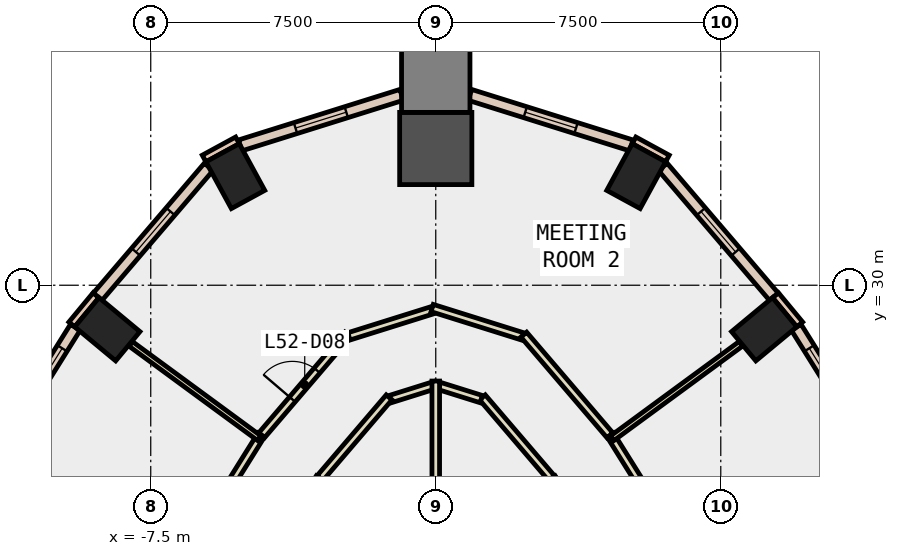
"""IFC4 building model, lengths in metres.
Left out: names, types, materials, properties, quantities, classifications, styles, units other than length and angle.
Written with IfcOpenShell. Run it as: python <this file> out.ifc"""

import sys

from ifc_helpers import new_model, si_unit, direction, frame, frame_2d, origin, origin_2d, place, context, subcontext, project, spatial, rectangle, extrude, element, fill, save


model = new_model("IFC4")
c1 = context("Model", 3, precision=1e-05, world=origin(), true_north=direction((0.0, 1.0)))
c2 = subcontext(c1, "Body", "Model", "MODEL_VIEW")
j1 = project(units=[si_unit("LENGTHUNIT", "METRE"), si_unit("PLANEANGLEUNIT", "RADIAN")], contexts=[c1])
p1 = place(None, origin())
s1 = spatial("IfcSite", under=j1, at=p1, CompositionType="ELEMENT")
p2 = place(p1, origin())
s2 = spatial("IfcBuilding", under=s1, at=p2, CompositionType="ELEMENT")
p3 = place(p2, frame((0.0, 0.0, 231.8)))
s3 = spatial("IfcBuildingStorey", under=s2, at=p3, CompositionType="ELEMENT", Elevation=231.8)
for number, where, z_axis, x_axis in (
    (1, (8.642, 28.842, -0.4), (0.0, 0.0, 1.0), (-0.639, 0.769, 0.0)),
    (2, (5.274, 32.871, -0.4), (0.0, 0.0, 1.0), (-0.878, 0.478, 0.0)),
):
    element("IfcColumn", number, at=place(p3, frame(where, z_axis=z_axis, x_axis=x_axis)), inside=s3, PredefinedType="COLUMN", context=c2, shape_type="SweptSolid", body=[
        extrude(rectangle(XDim=1.0, YDim=1.4, at=origin_2d()), origin(), (0.0, 0.0, 1.0), 4.0),
    ])
p4 = place(p3, frame((0.0, 33.598, -0.4), z_axis=(0.0, 0.0, 1.0), x_axis=(0.0, 1.0, 0.0)))
e3 = element("IfcColumn", 3, at=p4, inside=s3, PredefinedType="COLUMN", context=c2, shape_type="SweptSolid", body=[
    extrude(rectangle(XDim=1.9, YDim=1.9, at=origin_2d()), origin(), (0.0, 0.0, 1.0), 4.0),
])
for number, where, z_axis, x_axis in (
    (4, (-5.274, 32.871, -0.4), (0.0, 0.0, 1.0), (0.878, 0.478, 0.0)),
    (5, (-8.642, 28.842, -0.4), (0.0, 0.0, 1.0), (0.639, 0.769, 0.0)),
):
    element("IfcColumn", number, at=place(p3, frame(where, z_axis=z_axis, x_axis=x_axis)), inside=s3, PredefinedType="COLUMN", context=c2, shape_type="SweptSolid", body=[
        extrude(rectangle(XDim=1.0, YDim=1.4, at=origin_2d()), origin(), (0.0, 0.0, 1.0), 4.0),
    ])
p5 = place(p3, frame((0.0, 35.448, -0.4), z_axis=(0.0, 0.0, 1.0), x_axis=(0.0, 1.0, 0.0)))
e6 = element("IfcColumn", 6, at=p5, inside=s3, PredefinedType="COLUMN", context=c2, shape_type="SweptSolid", body=[
    extrude(rectangle(XDim=1.8, YDim=1.8, at=origin_2d()), origin(), (0.0, 0.0, 1.0), 4.0),
])
for number, where, z_axis, x_axis in (
    (7, (6.096, 33.334, 0.0), (0.0, 0.0, 1.0), (-0.878, 0.478, 0.0)),
    (8, (-5.218, 33.812, 0.0), (0.0, 0.0, 1.0), (-0.878, -0.478, 0.0)),
):
    element("IfcWall", number, at=place(p3, frame(where, z_axis=z_axis, x_axis=x_axis)), inside=s3, PredefinedType="STANDARD", context=c2, shape_type="SweptSolid", body=[
        extrude(rectangle(XDim=1.0, YDim=0.2, at=frame_2d((0.5, 0.0))), origin(), (0.0, 0.0, 1.0), 3.6),
    ])
for number, where, z_axis, x_axis in (
    (9, (9.577, 28.968, 0.0), (0.0, 0.0, 1.0), (-0.638, 0.77, 0.0)),
    (10, (-8.939, 29.738, 0.0), (0.0, 0.0, 1.0), (-0.638, -0.77, 0.0)),
):
    element("IfcWall", number, at=place(p3, frame(where, z_axis=z_axis, x_axis=x_axis)), inside=s3, PredefinedType="STANDARD", context=c2, shape_type="SweptSolid", body=[
        extrude(rectangle(XDim=1.0, YDim=0.2, at=frame_2d((0.5, 0.0))), origin(), (0.0, 0.0, 1.0), 3.6),
    ])
p6 = place(p3, frame((13.41, 22.614, 0.0), z_axis=(0.0, 0.0, 1.0), x_axis=(-0.530037467052, 0.847974223383, 0.0)))
e11 = element("IfcWall", 11, at=p6, inside=s3, PredefinedType="STANDARD", context=c2, shape_type="SweptSolid", body=[
    extrude(rectangle(XDim=7.405, YDim=0.3, at=frame_2d((3.702, 0.0))), origin(), (0.0, 0.0, 1.0), 3.6),
])
p7 = place(p6, frame((0.651, 0.0, 0.9)))
e12 = element("IfcOpeningElement", 12, at=p7, cuts=e11, PredefinedType="OPENING", context=c2, shape_type="SweptSolid", body=[
    extrude(rectangle(XDim=2.4, YDim=2.6, at=frame_2d((1.2, 1.3))), frame((0.0, 0.16, 0.0), z_axis=(0.0, -1.0, 0.0), x_axis=(1.0, 0.0, 0.0)), (0.0, 0.0, 1.0), 0.32),
])
p8 = place(p6, frame((4.354, 0.0, 0.9)))
e13 = element("IfcOpeningElement", 13, at=p8, cuts=e11, PredefinedType="OPENING", context=c2, shape_type="SweptSolid", body=[
    extrude(rectangle(XDim=2.4, YDim=2.6, at=frame_2d((1.2, 1.3))), frame((0.0, 0.16, 0.0), z_axis=(0.0, -1.0, 0.0), x_axis=(1.0, 0.0, 0.0)), (0.0, 0.0, 1.0), 0.32),
])
p9 = place(p3, frame((8.895, 29.7, 0.0), z_axis=(0.0, 0.0, 1.0), x_axis=(-0.649967502437, 0.75996200285, 0.0)))
e14 = element("IfcWall", 14, at=p9, inside=s3, PredefinedType="STANDARD", context=c2, shape_type="SweptSolid", body=[
    extrude(rectangle(XDim=4.492, YDim=0.3, at=frame_2d((2.246, 0.0))), origin(), (0.0, 0.0, 1.0), 3.6),
])
p10 = place(p9, frame((1.546, 0.0, 0.9)))
e15 = element("IfcOpeningElement", 15, at=p10, cuts=e14, PredefinedType="OPENING", context=c2, shape_type="SweptSolid", body=[
    extrude(rectangle(XDim=1.4, YDim=2.6, at=frame_2d((0.7, 1.3))), frame((0.0, 0.16, 0.0), z_axis=(0.0, -1.0, 0.0), x_axis=(1.0, 0.0, 0.0)), (0.0, 0.0, 1.0), 0.32),
])
p11 = place(p3, frame((5.146, 33.679, 0.0), z_axis=(0.0, 0.0, 1.0), x_axis=(-0.95429628924, 0.298862162783, 0.0)))
e16 = element("IfcWall", 16, at=p11, inside=s3, PredefinedType="STANDARD", context=c2, shape_type="SweptSolid", body=[
    extrude(rectangle(XDim=4.45, YDim=0.3, at=frame_2d((2.225, 0.0))), origin(), (0.0, 0.0, 1.0), 3.6),
])
p12 = place(p11, frame((1.525, 0.0, 0.9)))
e17 = element("IfcOpeningElement", 17, at=p12, cuts=e16, PredefinedType="OPENING", context=c2, shape_type="SweptSolid", body=[
    extrude(rectangle(XDim=1.4, YDim=2.6, at=frame_2d((0.7, 1.3))), frame((0.0, 0.16, 0.0), z_axis=(0.0, -1.0, 0.0), x_axis=(1.0, 0.0, 0.0)), (0.0, 0.0, 1.0), 0.32),
])
p13 = place(p3, frame((-0.899, 35.009, 0.0), z_axis=(0.0, 0.0, 1.0), x_axis=(-0.95429628924, -0.298862162783, 0.0)))
e18 = element("IfcWall", 18, at=p13, inside=s3, PredefinedType="STANDARD", context=c2, shape_type="SweptSolid", body=[
    extrude(rectangle(XDim=4.45, YDim=0.3, at=frame_2d((2.225, 0.0))), origin(), (0.0, 0.0, 1.0), 3.6),
])
p14 = place(p13, frame((1.525, 0.0, 0.9)))
e19 = element("IfcOpeningElement", 19, at=p14, cuts=e18, PredefinedType="OPENING", context=c2, shape_type="SweptSolid", body=[
    extrude(rectangle(XDim=1.4, YDim=2.6, at=frame_2d((0.7, 1.3))), frame((0.0, 0.16, 0.0), z_axis=(0.0, -1.0, 0.0), x_axis=(1.0, 0.0, 0.0)), (0.0, 0.0, 1.0), 0.32),
])
p15 = place(p3, frame((-5.975, 33.114, 0.0), z_axis=(0.0, 0.0, 1.0), x_axis=(-0.649967502437, -0.75996200285, 0.0)))
e20 = element("IfcWall", 20, at=p15, inside=s3, PredefinedType="STANDARD", context=c2, shape_type="SweptSolid", body=[
    extrude(rectangle(XDim=4.492, YDim=0.3, at=frame_2d((2.246, 0.0))), origin(), (0.0, 0.0, 1.0), 3.6),
])
p16 = place(p15, frame((1.546, 0.0, 0.9)))
e21 = element("IfcOpeningElement", 21, at=p16, cuts=e20, PredefinedType="OPENING", context=c2, shape_type="SweptSolid", body=[
    extrude(rectangle(XDim=1.4, YDim=2.6, at=frame_2d((0.7, 1.3))), frame((0.0, 0.16, 0.0), z_axis=(0.0, -1.0, 0.0), x_axis=(1.0, 0.0, 0.0)), (0.0, 0.0, 1.0), 0.32),
])
p17 = place(p3, frame((-9.485, 28.893, 0.0), z_axis=(0.0, 0.0, 1.0), x_axis=(-0.530037467052, -0.847974223383, 0.0)))
e22 = element("IfcWall", 22, at=p17, inside=s3, PredefinedType="STANDARD", context=c2, shape_type="SweptSolid", body=[
    extrude(rectangle(XDim=7.405, YDim=0.3, at=frame_2d((3.702, 0.0))), origin(), (0.0, 0.0, 1.0), 3.6),
])
p18 = place(p17, frame((0.651, 0.0, 0.9)))
e23 = element("IfcOpeningElement", 23, at=p18, cuts=e22, PredefinedType="OPENING", context=c2, shape_type="SweptSolid", body=[
    extrude(rectangle(XDim=2.4, YDim=2.6, at=frame_2d((1.2, 1.3))), frame((0.0, 0.16, 0.0), z_axis=(0.0, -1.0, 0.0), x_axis=(1.0, 0.0, 0.0)), (0.0, 0.0, 1.0), 0.32),
])
p19 = place(p17, frame((4.354, 0.0, 0.9)))
e24 = element("IfcOpeningElement", 24, at=p19, cuts=e22, PredefinedType="OPENING", context=c2, shape_type="SweptSolid", body=[
    extrude(rectangle(XDim=2.4, YDim=2.6, at=frame_2d((1.2, 1.3))), frame((0.0, 0.16, 0.0), z_axis=(0.0, -1.0, 0.0), x_axis=(1.0, 0.0, 0.0)), (0.0, 0.0, 1.0), 0.32),
])
p20 = place(p3, frame((5.087, 21.685, 0.0), z_axis=(0.0, 0.0, 1.0), x_axis=(-0.529998940003, 0.847998304005, 0.0)))
e25 = element("IfcWall", 25, at=p20, inside=s3, PredefinedType="PARTITIONING", context=c2, shape_type="SweptSolid", body=[
    extrude(rectangle(XDim=3.83, YDim=0.2, at=frame_2d((1.915, 0.0))), origin(), (0.0, 0.0, 1.0), 3.6),
])
p21 = place(p20, frame((1.416, 0.0, 0.0)))
e26 = element("IfcOpeningElement", 26, at=p21, cuts=e25, PredefinedType="OPENING", context=c2, shape_type="SweptSolid", body=[
    extrude(rectangle(XDim=1.0, YDim=2.1, at=frame_2d((0.5, 1.05))), frame((0.0, 0.11, 0.0), z_axis=(0.0, -1.0, 0.0), x_axis=(1.0, 0.0, 0.0)), (0.0, 0.0, 1.0), 0.22),
])
p22 = place(p3, frame((3.045, 24.925, 0.0), z_axis=(0.0, 0.0, 1.0), x_axis=(-0.650057725157, 0.759884829407, 0.0)))
e27 = element("IfcWall", 27, at=p22, inside=s3, PredefinedType="PARTITIONING", context=c2, shape_type="SweptSolid", body=[
    extrude(rectangle(XDim=2.796, YDim=0.2, at=frame_2d((1.398, 0.0))), origin(), (0.0, 0.0, 1.0), 3.6),
])
p23 = place(p3, frame((1.196, 27.004, 0.0), z_axis=(0.0, 0.0, 1.0), x_axis=(-0.954200976086, 0.29916633707, 0.0)))
e28 = element("IfcWall", 28, at=p23, inside=s3, PredefinedType="PARTITIONING", context=c2, shape_type="SweptSolid", body=[
    extrude(rectangle(XDim=1.154, YDim=0.2, at=frame_2d((0.577, 0.0))), origin(), (0.0, 0.0, 1.0), 3.6),
])
p24 = place(p3, frame((0.0, 27.379, 0.0), z_axis=(0.0, 0.0, 1.0), x_axis=(-0.954198830916, -0.299173179075, 0.0)))
e29 = element("IfcWall", 29, at=p24, inside=s3, PredefinedType="PARTITIONING", context=c2, shape_type="SweptSolid", body=[
    extrude(rectangle(XDim=1.253, YDim=0.2, at=frame_2d((0.627, 0.0))), origin(), (0.0, 0.0, 1.0), 3.6),
])
p25 = place(p3, frame((-1.227, 27.05, 0.0), z_axis=(0.0, 0.0, 1.0), x_axis=(-0.650057725157, -0.759884829407, 0.0)))
e30 = element("IfcWall", 30, at=p25, inside=s3, PredefinedType="PARTITIONING", context=c2, shape_type="SweptSolid", body=[
    extrude(rectangle(XDim=2.796, YDim=0.2, at=frame_2d((1.398, 0.0))), origin(), (0.0, 0.0, 1.0), 3.6),
])
p26 = place(p3, frame((-3.057, 24.933, 0.0), z_axis=(0.0, 0.0, 1.0), x_axis=(-0.529998940003, -0.847998304005, 0.0)))
e31 = element("IfcWall", 31, at=p26, inside=s3, PredefinedType="PARTITIONING", context=c2, shape_type="SweptSolid", body=[
    extrude(rectangle(XDim=3.83, YDim=0.2, at=frame_2d((1.915, 0.0))), origin(), (0.0, 0.0, 1.0), 3.6),
])
p27 = place(p26, frame((1.416, 0.0, 0.0)))
e32 = element("IfcOpeningElement", 32, at=p27, cuts=e31, PredefinedType="OPENING", context=c2, shape_type="SweptSolid", body=[
    extrude(rectangle(XDim=1.0, YDim=2.1, at=frame_2d((0.5, 1.05))), frame((0.0, 0.11, 0.0), z_axis=(0.0, -1.0, 0.0), x_axis=(1.0, 0.0, 0.0)), (0.0, 0.0, 1.0), 0.22),
])
p28 = place(p3, frame((4.593, 26.061, 0.0), z_axis=(0.0, 0.0, 1.0), x_axis=(0.530012579093, -0.847989779421, 0.0)))
e33 = element("IfcWall", 33, at=p28, inside=s3, PredefinedType="PARTITIONING", context=c2, shape_type="SweptSolid", body=[
    extrude(rectangle(XDim=8.045, YDim=0.2, at=frame_2d((4.022, 0.0))), origin(), (0.0, 0.0, 1.0), 3.6),
])
p29 = place(p28, frame((3.522, 0.0, 0.0)))
e34 = element("IfcOpeningElement", 34, at=p29, cuts=e33, PredefinedType="OPENING", context=c2, shape_type="SweptSolid", body=[
    extrude(rectangle(XDim=1.0, YDim=2.1, at=frame_2d((0.5, 1.05))), frame((0.0, 0.11, 0.0), z_axis=(0.0, -1.0, 0.0), x_axis=(1.0, 0.0, 0.0)), (0.0, 0.0, 1.0), 0.22),
])
p30 = place(p3, frame((-4.581, 26.052, 0.0), z_axis=(0.0, 0.0, 1.0), x_axis=(0.650040973726, 0.759899159413, 0.0)))
e35 = element("IfcWall", 35, at=p30, inside=s3, PredefinedType="PARTITIONING", context=c2, shape_type="SweptSolid", body=[
    extrude(rectangle(XDim=3.485, YDim=0.2, at=frame_2d((1.742, 0.0))), origin(), (0.0, 0.0, 1.0), 3.6),
])
p31 = place(p30, frame((1.243, 0.0, 0.0)))
e36 = element("IfcOpeningElement", 36, at=p31, cuts=e35, PredefinedType="OPENING", context=c2, shape_type="SweptSolid", body=[
    extrude(rectangle(XDim=1.0, YDim=2.1, at=frame_2d((0.5, 1.05))), frame((0.0, 0.11, 0.0), z_axis=(0.0, -1.0, 0.0), x_axis=(1.0, 0.0, 0.0)), (0.0, 0.0, 1.0), 0.22),
])
p32 = place(p3, frame((-2.285, 28.654, 0.0), z_axis=(0.0, 0.0, 1.0), x_axis=(0.954271519007, 0.298941245085, 0.0)))
e37 = element("IfcWall", 37, at=p32, inside=s3, PredefinedType="PARTITIONING", context=c2, shape_type="SweptSolid", body=[
    extrude(rectangle(XDim=2.295, YDim=0.2, at=frame_2d((1.147, 0.0))), origin(), (0.0, 0.0, 1.0), 3.6),
])
p33 = place(p3, frame((-0.095, 29.4, 0.0), z_axis=(0.0, 0.0, 1.0), x_axis=(0.954235803916, -0.29905522989, 0.0)))
e38 = element("IfcWall", 38, at=p33, inside=s3, PredefinedType="PARTITIONING", context=c2, shape_type="SweptSolid", body=[
    extrude(rectangle(XDim=2.494, YDim=0.2, at=frame_2d((1.247, 0.0))), origin(), (0.0, 0.0, 1.0), 3.6),
])
p34 = place(p3, frame((2.316, 28.7, 0.0), z_axis=(0.0, 0.0, 1.0), x_axis=(0.650040973726, -0.759899159413, 0.0)))
e39 = element("IfcWall", 39, at=p34, inside=s3, PredefinedType="PARTITIONING", context=c2, shape_type="SweptSolid", body=[
    extrude(rectangle(XDim=3.485, YDim=0.2, at=frame_2d((1.742, 0.0))), origin(), (0.0, 0.0, 1.0), 3.6),
])
p35 = place(p3, frame((-8.896, 19.176, 0.0), z_axis=(0.0, 0.0, 1.0), x_axis=(0.529985425286, 0.848006750553, 0.0)))
e40 = element("IfcWall", 40, at=p35, inside=s3, PredefinedType="PARTITIONING", context=c2, shape_type="SweptSolid", body=[
    extrude(rectangle(XDim=8.119, YDim=0.2, at=frame_2d((4.06, 0.0))), origin(), (0.0, 0.0, 1.0), 3.6),
])
p36 = place(p35, frame((3.56, 0.0, 0.0)))
e41 = element("IfcOpeningElement", 41, at=p36, cuts=e40, PredefinedType="OPENING", context=c2, shape_type="SweptSolid", body=[
    extrude(rectangle(XDim=1.0, YDim=2.1, at=frame_2d((0.5, 1.05))), frame((0.0, 0.11, 0.0), z_axis=(0.0, -1.0, 0.0), x_axis=(1.0, 0.0, 0.0)), (0.0, 0.0, 1.0), 0.22),
])
p37 = place(p3, frame((0.0, 23.0, 0.0), z_axis=(0.0, 0.0, 1.0), x_axis=(0.0, 1.0, 0.0)))
e42 = element("IfcWall", 42, at=p37, inside=s3, PredefinedType="PARTITIONING", context=c2, shape_type="SweptSolid", body=[
    extrude(rectangle(XDim=4.479, YDim=0.2, at=frame_2d((2.24, 0.0))), origin(), (0.0, 0.0, 1.0), 3.6),
])
for number, where, z_axis, x_axis in (
    (43, (4.646, 25.976, 0.0), (0.0, 0.0, 1.0), (0.806, 0.592, 0.0)),
    (44, (-4.646, 25.976, 0.0), (0.0, 0.0, 1.0), (-0.806, 0.592, 0.0)),
):
    element("IfcWall", number, at=place(p3, frame(where, z_axis=z_axis, x_axis=x_axis)), inside=s3, PredefinedType="PARTITIONING", context=c2, shape_type="SweptSolid", body=[
        extrude(rectangle(XDim=4.193, YDim=0.15, at=frame_2d((2.096, 0.0))), origin(), (0.0, 0.0, 1.0), 3.6),
    ])
p38 = place(p8, origin())
e45 = element("IfcWindow", 45, at=p38, inside=s3, PartitioningType="SINGLE_PANEL", PredefinedType="WINDOW", context=c2, shape_type="SweptSolid", body=[
    extrude(rectangle(XDim=2.4, YDim=2.6, at=frame_2d((1.2, 1.3))), frame((0.0, 0.03, 0.0), z_axis=(0.0, -1.0, 0.0), x_axis=(1.0, 0.0, 0.0)), (0.0, 0.0, 1.0), 0.06),
])
fill(e13, e45)
p39 = place(p10, origin())
e46 = element("IfcWindow", 46, at=p39, inside=s3, PartitioningType="SINGLE_PANEL", PredefinedType="WINDOW", context=c2, shape_type="SweptSolid", body=[
    extrude(rectangle(XDim=1.4, YDim=2.6, at=frame_2d((0.7, 1.3))), frame((0.0, 0.03, 0.0), z_axis=(0.0, -1.0, 0.0), x_axis=(1.0, 0.0, 0.0)), (0.0, 0.0, 1.0), 0.06),
])
fill(e15, e46)
p40 = place(p12, origin())
e47 = element("IfcWindow", 47, at=p40, inside=s3, PartitioningType="SINGLE_PANEL", PredefinedType="WINDOW", context=c2, shape_type="SweptSolid", body=[
    extrude(rectangle(XDim=1.4, YDim=2.6, at=frame_2d((0.7, 1.3))), frame((0.0, 0.03, 0.0), z_axis=(0.0, -1.0, 0.0), x_axis=(1.0, 0.0, 0.0)), (0.0, 0.0, 1.0), 0.06),
])
fill(e17, e47)
p41 = place(p14, origin())
e48 = element("IfcWindow", 48, at=p41, inside=s3, PartitioningType="SINGLE_PANEL", PredefinedType="WINDOW", context=c2, shape_type="SweptSolid", body=[
    extrude(rectangle(XDim=1.4, YDim=2.6, at=frame_2d((0.7, 1.3))), frame((0.0, 0.03, 0.0), z_axis=(0.0, -1.0, 0.0), x_axis=(1.0, 0.0, 0.0)), (0.0, 0.0, 1.0), 0.06),
])
fill(e19, e48)
p42 = place(p16, origin())
e49 = element("IfcWindow", 49, at=p42, inside=s3, PartitioningType="SINGLE_PANEL", PredefinedType="WINDOW", context=c2, shape_type="SweptSolid", body=[
    extrude(rectangle(XDim=1.4, YDim=2.6, at=frame_2d((0.7, 1.3))), frame((0.0, 0.03, 0.0), z_axis=(0.0, -1.0, 0.0), x_axis=(1.0, 0.0, 0.0)), (0.0, 0.0, 1.0), 0.06),
])
fill(e21, e49)
p43 = place(p18, origin())
e50 = element("IfcWindow", 50, at=p43, inside=s3, PartitioningType="SINGLE_PANEL", PredefinedType="WINDOW", context=c2, shape_type="SweptSolid", body=[
    extrude(rectangle(XDim=2.4, YDim=2.6, at=frame_2d((1.2, 1.3))), frame((0.0, 0.03, 0.0), z_axis=(0.0, -1.0, 0.0), x_axis=(1.0, 0.0, 0.0)), (0.0, 0.0, 1.0), 0.06),
])
fill(e23, e50)
p44 = place(p31, origin())
e51 = element("IfcDoor", 51, at=p44, inside=s3, OperationType="SINGLE_SWING_LEFT", PredefinedType="DOOR", context=c2, shape_type="SweptSolid", body=[
    extrude(rectangle(XDim=1.0, YDim=2.1, at=frame_2d((0.5, 1.05))), frame((0.0, 0.025, 0.0), z_axis=(0.0, -1.0, 0.0), x_axis=(1.0, 0.0, 0.0)), (0.0, 0.0, 1.0), 0.05),
])
fill(e36, e51)
save(model, sys.argv[1])
